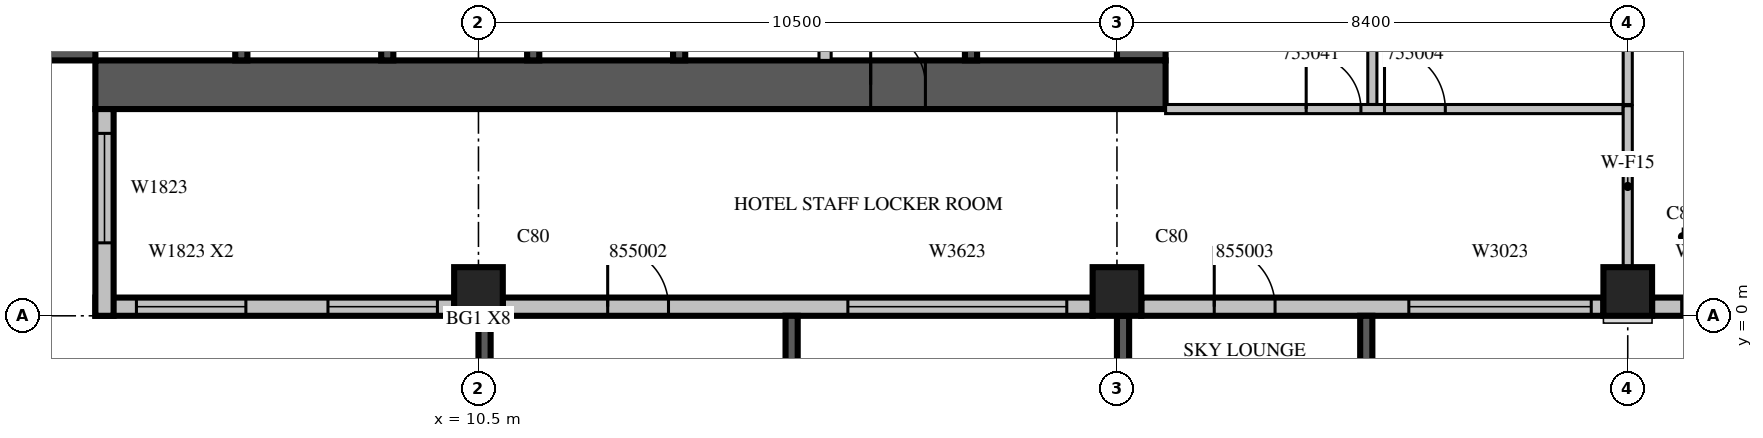
"""IFC4 building model, lengths in metres.
Left out: names, types, materials, properties, quantities, classifications, styles, units other than length and angle.
Written with IfcOpenShell. Run it as: python <this file> out.ifc"""

import sys

from ifc_helpers import new_model, si_unit, direction, frame, frame_2d, origin, origin_2d, place, context, subcontext, project, spatial, rectangle, extrude, source, transform, mapped, element, fill, save


model = new_model("IFC4")
c1 = context("Model", 3, precision=1e-05, world=origin(), true_north=direction((0.0, 1.0)))
c2 = subcontext(c1, "Body", "Model", "MODEL_VIEW")
j1 = project(units=[si_unit("LENGTHUNIT", "METRE"), si_unit("PLANEANGLEUNIT", "RADIAN")], contexts=[c1])
p1 = place(None, origin())
s1 = spatial("IfcSite", under=j1, at=p1, CompositionType="ELEMENT")
p2 = place(p1, origin())
s2 = spatial("IfcBuilding", under=s1, at=p2, CompositionType="ELEMENT")
p3 = place(p2, frame((0.0, 0.0, 242.4)))
s3 = spatial("IfcBuildingStorey", under=s2, at=p3, CompositionType="ELEMENT", Elevation=242.4)
m1 = source(origin(), c2, "Body", "SweptSolid", [
    extrude(rectangle(XDim=0.8, YDim=0.8, at=origin_2d()), origin(), (0.0, 0.0, 1.0), 3.8),
])
for number, where, z_axis, x_axis in (
    (1, (10.5, 0.4, 0.0), (0.0, 0.0, 1.0), (1.0, 0.0, 0.0)),
    (2, (21.0, 0.4, 0.0), (0.0, 0.0, 1.0), (1.0, 0.0, 0.0)),
    (3, (29.4, 0.4, 0.0), (0.0, 0.0, 1.0), (1.0, 0.0, 0.0)),
):
    element("IfcColumn", number, at=place(p3, frame(where, z_axis=z_axis, x_axis=x_axis)), inside=s3, PredefinedType="COLUMN", context=c2, shape_type="MappedRepresentation", body=[
        mapped(m1, transform((0.0, 0.0, 0.0), scale=1.0)),
    ])
m2 = source(origin(), c2, "Body", "SweptSolid", [
    extrude(rectangle(XDim=17.6, YDim=0.8, at=frame_2d((8.8, 0.0))), origin(), (0.0, 0.0, 1.0), 3.8),
])
p4 = place(p3, frame((3.8, 4.2, 0.0), z_axis=(0.0, 0.0, 1.0), x_axis=(0.0, 1.0, 0.0)))
e4 = element("IfcWall", 4, at=p4, inside=s3, PredefinedType="SHEAR", context=c2, shape_type="MappedRepresentation", body=[
    mapped(m2, transform((0.0, 0.0, 0.0), scale=1.0)),
])
m3 = source(origin(), c2, "Body", "SweptSolid", [
    extrude(rectangle(XDim=2.2, YDim=2.1, at=frame_2d((1.1, 1.05))), frame((0.0, 0.41, 0.0), z_axis=(0.0, -1.0, 0.0), x_axis=(1.0, 0.0, 0.0)), (0.0, 0.0, 1.0), 0.82),
])
p5 = place(p4, frame((4.2, 0.0, 0.0)))
e5 = element("IfcOpeningElement", 5, at=p5, cuts=e4, PredefinedType="OPENING", context=c2, shape_type="MappedRepresentation", body=[
    mapped(m3, transform((0.0, 0.0, 0.0), scale=1.0)),
])
m4 = source(origin(), c2, "Body", "SweptSolid", [
    extrude(rectangle(XDim=0.9, YDim=2.1, at=frame_2d((0.45, 1.05))), frame((0.0, 0.41, 0.0), z_axis=(0.0, -1.0, 0.0), x_axis=(1.0, 0.0, 0.0)), (0.0, 0.0, 1.0), 0.82),
])
p6 = place(p4, frame((10.95, 0.0, 0.0)))
e6 = element("IfcOpeningElement", 6, at=p6, cuts=e4, PredefinedType="OPENING", context=c2, shape_type="MappedRepresentation", body=[
    mapped(m4, transform((0.0, 0.0, 0.0), scale=1.0)),
])
m5 = source(origin(), c2, "Body", "SweptSolid", [
    extrude(rectangle(XDim=16.8, YDim=0.8, at=frame_2d((8.4, 0.0))), origin(), (0.0, 0.0, 1.0), 3.8),
])
p7 = place(p3, frame((21.4, 4.2, 0.0), z_axis=(0.0, 0.0, 1.0), x_axis=(0.0, 1.0, 0.0)))
e7 = element("IfcWall", 7, at=p7, inside=s3, PredefinedType="SHEAR", context=c2, shape_type="MappedRepresentation", body=[
    mapped(m5, transform((0.0, 0.0, 0.0), scale=1.0)),
])
p8 = place(p7, frame((4.2, 0.0, 0.0)))
e8 = element("IfcOpeningElement", 8, at=p8, cuts=e7, PredefinedType="OPENING", context=c2, shape_type="MappedRepresentation", body=[
    mapped(m3, transform((0.0, 0.0, 0.0), scale=1.0)),
])
m6 = source(origin(), c2, "Body", "SweptSolid", [
    extrude(rectangle(XDim=1.2, YDim=2.1, at=frame_2d((0.6, 1.05))), frame((0.0, 0.41, 0.0), z_axis=(0.0, -1.0, 0.0), x_axis=(1.0, 0.0, 0.0)), (0.0, 0.0, 1.0), 0.82),
])
p9 = place(p7, frame((14.7, 0.0, 0.0)))
e9 = element("IfcOpeningElement", 9, at=p9, cuts=e7, PredefinedType="OPENING", context=c2, shape_type="MappedRepresentation", body=[
    mapped(m6, transform((0.0, 0.0, 0.0), scale=1.0)),
])
p10 = place(p3, frame((4.2, 3.8, 0.0), z_axis=(0.0, 0.0, 1.0), x_axis=(1.0, 0.0, 0.0)))
e10 = element("IfcWall", 10, at=p10, inside=s3, PredefinedType="SHEAR", context=c2, shape_type="MappedRepresentation", body=[
    mapped(m2, transform((0.0, 0.0, 0.0), scale=1.0)),
])
p11 = place(p10, frame((12.75, 0.0, 0.0)))
e11 = element("IfcOpeningElement", 11, at=p11, cuts=e10, PredefinedType="OPENING", context=c2, shape_type="MappedRepresentation", body=[
    mapped(m4, transform((0.0, 0.0, 0.0), scale=1.0)),
])
m7 = source(origin(), c2, "Body", "SweptSolid", [
    extrude(rectangle(XDim=5.9, YDim=0.3, at=frame_2d((2.95, 0.0))), origin(), (0.0, 0.0, 1.0), 3.4),
])
p12 = place(p3, frame((4.2, 0.15, 0.0), z_axis=(0.0, 0.0, 1.0), x_axis=(1.0, 0.0, 0.0)))
e12 = element("IfcWall", 12, at=p12, inside=s3, PredefinedType="STANDARD", context=c2, shape_type="MappedRepresentation", body=[
    mapped(m7, transform((0.0, 0.0, 0.0), scale=1.0)),
])
m8 = source(origin(), c2, "Body", "SweptSolid", [
    extrude(rectangle(XDim=1.8, YDim=2.3, at=frame_2d((0.9, 1.15))), frame((0.0, 0.16, 0.0), z_axis=(0.0, -1.0, 0.0), x_axis=(1.0, 0.0, 0.0)), (0.0, 0.0, 1.0), 0.32),
])
p13 = place(p12, frame((0.675, 0.0, 0.6)))
e13 = element("IfcOpeningElement", 13, at=p13, cuts=e12, PredefinedType="OPENING", context=c2, shape_type="MappedRepresentation", body=[
    mapped(m8, transform((0.0, 0.0, 0.0), scale=1.0)),
])
p14 = place(p12, frame((3.825, 0.0, 0.6)))
e14 = element("IfcOpeningElement", 14, at=p14, cuts=e12, PredefinedType="OPENING", context=c2, shape_type="MappedRepresentation", body=[
    mapped(m8, transform((0.0, 0.0, 0.0), scale=1.0)),
])
m9 = source(origin(), c2, "Body", "SweptSolid", [
    extrude(rectangle(XDim=9.7, YDim=0.3, at=frame_2d((4.85, 0.0))), origin(), (0.0, 0.0, 1.0), 3.4),
])
p15 = place(p3, frame((10.9, 0.15, 0.0), z_axis=(0.0, 0.0, 1.0), x_axis=(1.0, 0.0, 0.0)))
e15 = element("IfcWall", 15, at=p15, inside=s3, PredefinedType="STANDARD", context=c2, shape_type="MappedRepresentation", body=[
    mapped(m9, transform((0.0, 0.0, 0.0), scale=1.0)),
])
m10 = source(origin(), c2, "Body", "SweptSolid", [
    extrude(rectangle(XDim=3.6, YDim=2.3, at=frame_2d((1.8, 1.15))), frame((0.0, 0.16, 0.0), z_axis=(0.0, -1.0, 0.0), x_axis=(1.0, 0.0, 0.0)), (0.0, 0.0, 1.0), 0.32),
])
p16 = place(p15, frame((5.675, 0.0, 0.6)))
e16 = element("IfcOpeningElement", 16, at=p16, cuts=e15, PredefinedType="OPENING", context=c2, shape_type="MappedRepresentation", body=[
    mapped(m10, transform((0.0, 0.0, 0.0), scale=1.0)),
])
m11 = source(origin(), c2, "Body", "SweptSolid", [
    extrude(rectangle(XDim=1.0, YDim=2.1, at=frame_2d((0.5, 1.05))), frame((0.0, 0.16, 0.0), z_axis=(0.0, -1.0, 0.0), x_axis=(1.0, 0.0, 0.0)), (0.0, 0.0, 1.0), 0.32),
])
p17 = place(p15, frame((1.725, 0.0, 0.0)))
e17 = element("IfcOpeningElement", 17, at=p17, cuts=e15, PredefinedType="OPENING", context=c2, shape_type="MappedRepresentation", body=[
    mapped(m11, transform((0.0, 0.0, 0.0), scale=1.0)),
])
m12 = source(origin(), c2, "Body", "SweptSolid", [
    extrude(rectangle(XDim=7.6, YDim=0.3, at=frame_2d((3.8, 0.0))), origin(), (0.0, 0.0, 1.0), 3.4),
])
p18 = place(p3, frame((21.4, 0.15, 0.0), z_axis=(0.0, 0.0, 1.0), x_axis=(1.0, 0.0, 0.0)))
e18 = element("IfcWall", 18, at=p18, inside=s3, PredefinedType="STANDARD", context=c2, shape_type="MappedRepresentation", body=[
    mapped(m12, transform((0.0, 0.0, 0.0), scale=1.0)),
])
m13 = source(origin(), c2, "Body", "SweptSolid", [
    extrude(rectangle(XDim=3.0, YDim=2.3, at=frame_2d((1.5, 1.15))), frame((0.0, 0.16, 0.0), z_axis=(0.0, -1.0, 0.0), x_axis=(1.0, 0.0, 0.0)), (0.0, 0.0, 1.0), 0.32),
])
p19 = place(p18, frame((4.4, 0.0, 0.6)))
e19 = element("IfcOpeningElement", 19, at=p19, cuts=e18, PredefinedType="OPENING", context=c2, shape_type="MappedRepresentation", body=[
    mapped(m13, transform((0.0, 0.0, 0.0), scale=1.0)),
])
p20 = place(p18, frame((1.2, 0.0, 0.0)))
e20 = element("IfcOpeningElement", 20, at=p20, cuts=e18, PredefinedType="OPENING", context=c2, shape_type="MappedRepresentation", body=[
    mapped(m11, transform((0.0, 0.0, 0.0), scale=1.0)),
])
p21 = place(p3, frame((29.8, 0.15, 0.0), z_axis=(0.0, 0.0, 1.0), x_axis=(1.0, 0.0, 0.0)))
e21 = element("IfcWall", 21, at=p21, inside=s3, PredefinedType="STANDARD", context=c2, shape_type="MappedRepresentation", body=[
    mapped(m12, transform((0.0, 0.0, 0.0), scale=1.0)),
])
m14 = source(origin(), c2, "Body", "SweptSolid", [
    extrude(rectangle(XDim=1.2, YDim=2.3, at=frame_2d((0.6, 1.15))), frame((0.0, 0.16, 0.0), z_axis=(0.0, -1.0, 0.0), x_axis=(1.0, 0.0, 0.0)), (0.0, 0.0, 1.0), 0.32),
])
p22 = place(p21, frame((0.487, 0.0, 0.6)))
e22 = element("IfcOpeningElement", 22, at=p22, cuts=e21, PredefinedType="OPENING", context=c2, shape_type="MappedRepresentation", body=[
    mapped(m14, transform((0.0, 0.0, 0.0), scale=1.0)),
])
p23 = place(p21, frame((6.013, 0.0, 0.6)))
e23 = element("IfcOpeningElement", 23, at=p23, cuts=e21, PredefinedType="OPENING", context=c2, shape_type="MappedRepresentation", body=[
    mapped(m14, transform((0.0, 0.0, 0.0), scale=1.0)),
])
m15 = source(origin(), c2, "Body", "SweptSolid", [
    extrude(rectangle(XDim=3.4, YDim=0.3, at=frame_2d((1.7, 0.0))), origin(), (0.0, 0.0, 1.0), 3.4),
])
p24 = place(p3, frame((4.35, 3.4, 0.0), z_axis=(0.0, 0.0, 1.0), x_axis=(0.0, -1.0, 0.0)))
e24 = element("IfcWall", 24, at=p24, inside=s3, PredefinedType="STANDARD", context=c2, shape_type="MappedRepresentation", body=[
    mapped(m15, transform((0.0, 0.0, 0.0), scale=1.0)),
])
p25 = place(p24, frame((0.4, 0.0, 0.6)))
e25 = element("IfcOpeningElement", 25, at=p25, cuts=e24, PredefinedType="OPENING", context=c2, shape_type="MappedRepresentation", body=[
    mapped(m8, transform((0.0, 0.0, 0.0), scale=1.0)),
])
m16 = source(origin(), c2, "Body", "SweptSolid", [
    extrude(rectangle(XDim=3.9, YDim=0.2, at=frame_2d((1.95, 0.0))), origin(), (0.0, 0.0, 1.0), 3.39),
])
p26 = place(p3, frame((10.6, 0.0, 0.0), z_axis=(0.0, 0.0, 1.0), x_axis=(0.0, -1.0, 0.0)))
e26 = element("IfcWall", 26, at=p26, inside=s3, PredefinedType="SOLIDWALL", context=c2, shape_type="MappedRepresentation", body=[
    mapped(m16, transform((0.0, 0.0, 0.0), scale=1.0)),
])
m17 = source(origin(), c2, "Body", "SweptSolid", [
    extrude(rectangle(XDim=2.4, YDim=2.3, at=frame_2d((1.2, 1.15))), frame((0.0, 0.11, 0.0), z_axis=(0.0, -1.0, 0.0), x_axis=(1.0, 0.0, 0.0)), (0.0, 0.0, 1.0), 0.22),
])
p27 = place(p26, frame((0.75, 0.0, 0.6)))
e27 = element("IfcOpeningElement", 27, at=p27, cuts=e26, PredefinedType="OPENING", context=c2, shape_type="MappedRepresentation", body=[
    mapped(m17, transform((0.0, 0.0, 0.0), scale=1.0)),
])
p28 = place(p3, frame((15.65, 0.0, 0.0), z_axis=(0.0, 0.0, 1.0), x_axis=(0.0, -1.0, 0.0)))
e28 = element("IfcWall", 28, at=p28, inside=s3, PredefinedType="SOLIDWALL", context=c2, shape_type="MappedRepresentation", body=[
    mapped(m16, transform((0.0, 0.0, 0.0), scale=1.0)),
])
p29 = place(p28, frame((0.75, 0.0, 0.6)))
e29 = element("IfcOpeningElement", 29, at=p29, cuts=e28, PredefinedType="OPENING", context=c2, shape_type="MappedRepresentation", body=[
    mapped(m17, transform((0.0, 0.0, 0.0), scale=1.0)),
])
p30 = place(p3, frame((21.1, 0.0, 0.0), z_axis=(0.0, 0.0, 1.0), x_axis=(0.0, -1.0, 0.0)))
e30 = element("IfcWall", 30, at=p30, inside=s3, PredefinedType="SOLIDWALL", context=c2, shape_type="MappedRepresentation", body=[
    mapped(m16, transform((0.0, 0.0, 0.0), scale=1.0)),
])
p31 = place(p30, frame((0.75, 0.0, 0.6)))
e31 = element("IfcOpeningElement", 31, at=p31, cuts=e30, PredefinedType="OPENING", context=c2, shape_type="MappedRepresentation", body=[
    mapped(m17, transform((0.0, 0.0, 0.0), scale=1.0)),
])
p32 = place(p3, frame((25.1, 0.0, 0.0), z_axis=(0.0, 0.0, 1.0), x_axis=(0.0, -1.0, 0.0)))
e32 = element("IfcWall", 32, at=p32, inside=s3, PredefinedType="SOLIDWALL", context=c2, shape_type="MappedRepresentation", body=[
    mapped(m16, transform((0.0, 0.0, 0.0), scale=1.0)),
])
p33 = place(p32, frame((0.75, 0.0, 0.6)))
e33 = element("IfcOpeningElement", 33, at=p33, cuts=e32, PredefinedType="OPENING", context=c2, shape_type="MappedRepresentation", body=[
    mapped(m17, transform((0.0, 0.0, 0.0), scale=1.0)),
])
m18 = source(origin(), c2, "Body", "SweptSolid", [
    extrude(rectangle(XDim=3.1, YDim=0.2, at=frame_2d((1.55, 0.0))), origin(), (0.0, 0.0, 1.0), 3.8),
])
for number, where, z_axis, x_axis in (
    (34, (6.6, 4.2, 0.0), (0.0, 0.0, 1.0), (0.0, 1.0, 0.0)),
    (35, (9.0, 4.2, 0.0), (0.0, 0.0, 1.0), (0.0, 1.0, 0.0)),
    (36, (11.4, 4.2, 0.0), (0.0, 0.0, 1.0), (0.0, 1.0, 0.0)),
):
    element("IfcWall", number, at=place(p3, frame(where, z_axis=z_axis, x_axis=x_axis)), inside=s3, PredefinedType="SOLIDWALL", context=c2, shape_type="MappedRepresentation", body=[
        mapped(m18, transform((0.0, 0.0, 0.0), scale=1.0)),
    ])
m19 = source(origin(), c2, "Body", "SweptSolid", [
    extrude(rectangle(XDim=3.1, YDim=0.2, at=frame_2d((1.55, 0.0))), origin(), (0.0, 0.0, 1.0), 3.4),
])
for number, where, z_axis, x_axis in (
    (37, (13.8, 4.2, 0.0), (0.0, 0.0, 1.0), (0.0, 1.0, 0.0)),
    (38, (18.6, 4.2, 0.0), (0.0, 0.0, 1.0), (0.0, 1.0, 0.0)),
):
    element("IfcWall", number, at=place(p3, frame(where, z_axis=z_axis, x_axis=x_axis)), inside=s3, PredefinedType="SOLIDWALL", context=c2, shape_type="MappedRepresentation", body=[
        mapped(m19, transform((0.0, 0.0, 0.0), scale=1.0)),
    ])
m20 = source(origin(), c2, "Body", "SweptSolid", [
    extrude(rectangle(XDim=3.1, YDim=0.2, at=frame_2d((1.55, 0.0))), origin(), (0.0, 0.0, 1.0), 3.4),
])
p34 = place(p3, frame((16.2, 4.2, 0.0), z_axis=(0.0, 0.0, 1.0), x_axis=(0.0, 1.0, 0.0)))
e39 = element("IfcWall", 39, at=p34, inside=s3, PredefinedType="PARTITIONING", context=c2, shape_type="MappedRepresentation", body=[
    mapped(m20, transform((0.0, 0.0, 0.0), scale=1.0)),
])
m21 = source(origin(), c2, "Body", "SweptSolid", [
    extrude(rectangle(XDim=11.225, YDim=0.15, at=frame_2d((5.612, 0.0))), origin(), (0.0, 0.0, 1.0), 3.4),
])
p35 = place(p3, frame((25.2, 14.7, 0.0), z_axis=(0.0, 0.0, 1.0), x_axis=(0.0, -1.0, 0.0)))
e40 = element("IfcWall", 40, at=p35, inside=s3, PredefinedType="PARTITIONING", context=c2, shape_type="MappedRepresentation", body=[
    mapped(m21, transform((0.0, 0.0, 0.0), scale=1.0)),
])
m22 = source(origin(), c2, "Body", "SweptSolid", [
    extrude(rectangle(XDim=0.9, YDim=2.1, at=frame_2d((0.45, 1.05))), frame((0.0, 0.085, 0.0), z_axis=(0.0, -1.0, 0.0), x_axis=(1.0, 0.0, 0.0)), (0.0, 0.0, 1.0), 0.17),
])
p36 = place(p35, frame((6.662, 0.0, 0.0)))
e41 = element("IfcOpeningElement", 41, at=p36, cuts=e40, PredefinedType="OPENING", context=c2, shape_type="MappedRepresentation", body=[
    mapped(m22, transform((0.0, 0.0, 0.0), scale=1.0)),
])
p37 = place(p35, frame((0.175, 0.0, 0.0)))
e42 = element("IfcOpeningElement", 42, at=p37, cuts=e40, PredefinedType="OPENING", context=c2, shape_type="MappedRepresentation", body=[
    mapped(m22, transform((0.0, 0.0, 0.0), scale=1.0)),
])
m23 = source(origin(), c2, "Body", "SweptSolid", [
    extrude(rectangle(XDim=6.626, YDim=0.15, at=frame_2d((3.313, 0.0))), origin(), (0.0, 0.0, 1.0), 3.4),
])
p38 = place(p3, frame((29.4, 3.475, 0.0), z_axis=(0.0, 0.0, 1.0), x_axis=(0.0, 1.0, 0.0)))
e43 = element("IfcWall", 43, at=p38, inside=s3, PredefinedType="PARTITIONING", context=c2, shape_type="MappedRepresentation", body=[
    mapped(m23, transform((0.0, 0.0, 0.0), scale=1.0)),
])
m24 = source(origin(), c2, "Body", "SweptSolid", [
    extrude(rectangle(XDim=7.525, YDim=0.15, at=frame_2d((3.763, 0.0))), origin(), (0.0, 0.0, 1.0), 3.4),
])
p39 = place(p3, frame((21.8, 3.4, 0.0), z_axis=(0.0, 0.0, 1.0), x_axis=(1.0, 0.0, 0.0)))
e44 = element("IfcWall", 44, at=p39, inside=s3, PredefinedType="PARTITIONING", context=c2, shape_type="MappedRepresentation", body=[
    mapped(m24, transform((0.0, 0.0, 0.0), scale=1.0)),
])
m25 = source(origin(), c2, "Body", "SweptSolid", [
    extrude(rectangle(XDim=1.0, YDim=2.1, at=frame_2d((0.5, 1.05))), frame((0.0, 0.085, 0.0), z_axis=(0.0, -1.0, 0.0), x_axis=(1.0, 0.0, 0.0)), (0.0, 0.0, 1.0), 0.17),
])
p40 = place(p39, frame((3.6, 0.0, 0.0)))
e45 = element("IfcOpeningElement", 45, at=p40, cuts=e44, PredefinedType="OPENING", context=c2, shape_type="MappedRepresentation", body=[
    mapped(m25, transform((0.0, 0.0, 0.0), scale=1.0)),
])
p41 = place(p39, frame((2.312, 0.0, 0.0)))
e46 = element("IfcOpeningElement", 46, at=p41, cuts=e44, PredefinedType="OPENING", context=c2, shape_type="MappedRepresentation", body=[
    mapped(m22, transform((0.0, 0.0, 0.0), scale=1.0)),
])
m26 = source(origin(), c2, "Body", "SweptSolid", [
    extrude(rectangle(XDim=2.656, YDim=0.15, at=frame_2d((1.328, 0.0))), origin(), (0.0, 0.0, 1.0), 3.4),
])
p42 = place(p3, frame((29.4, 0.799, 0.0), z_axis=(0.0, 0.0, 1.0), x_axis=(0.0, 1.0, 0.0)))
e47 = element("IfcWall", 47, at=p42, inside=s3, PredefinedType="PARTITIONING", context=c2, shape_type="MappedRepresentation", body=[
    mapped(m26, transform((0.0, 0.0, 0.0), scale=1.0)),
])
m27 = source(origin(), c2, "Body", "SweptSolid", [
    extrude(rectangle(XDim=1.8, YDim=2.3, at=frame_2d((0.9, 1.15))), frame((0.0, 0.03, 0.0), z_axis=(0.0, -1.0, 0.0), x_axis=(1.0, 0.0, 0.0)), (0.0, 0.0, 1.0), 0.06),
])
p43 = place(p13, origin())
e48 = element("IfcWindow", 48, at=p43, inside=s3, PartitioningType="SINGLE_PANEL", PredefinedType="WINDOW", context=c2, shape_type="MappedRepresentation", body=[
    mapped(m27, transform((0.0, 0.0, 0.0), scale=1.0)),
])
fill(e13, e48)
p44 = place(p14, origin())
e49 = element("IfcWindow", 49, at=p44, inside=s3, PartitioningType="SINGLE_PANEL", PredefinedType="WINDOW", context=c2, shape_type="MappedRepresentation", body=[
    mapped(m27, transform((0.0, 0.0, 0.0), scale=1.0)),
])
fill(e14, e49)
m28 = source(origin(), c2, "Body", "SweptSolid", [
    extrude(rectangle(XDim=3.6, YDim=2.3, at=frame_2d((1.8, 1.15))), frame((0.0, 0.03, 0.0), z_axis=(0.0, -1.0, 0.0), x_axis=(1.0, 0.0, 0.0)), (0.0, 0.0, 1.0), 0.06),
])
p45 = place(p16, origin())
e50 = element("IfcWindow", 50, at=p45, inside=s3, PartitioningType="SINGLE_PANEL", PredefinedType="WINDOW", context=c2, shape_type="MappedRepresentation", body=[
    mapped(m28, transform((0.0, 0.0, 0.0), scale=1.0)),
])
fill(e16, e50)
m29 = source(origin(), c2, "Body", "SweptSolid", [
    extrude(rectangle(XDim=3.0, YDim=2.3, at=frame_2d((1.5, 1.15))), frame((0.0, 0.03, 0.0), z_axis=(0.0, -1.0, 0.0), x_axis=(1.0, 0.0, 0.0)), (0.0, 0.0, 1.0), 0.06),
])
p46 = place(p19, origin())
e51 = element("IfcWindow", 51, at=p46, inside=s3, PartitioningType="SINGLE_PANEL", PredefinedType="WINDOW", context=c2, shape_type="MappedRepresentation", body=[
    mapped(m29, transform((0.0, 0.0, 0.0), scale=1.0)),
])
fill(e19, e51)
m30 = source(origin(), c2, "Body", "SweptSolid", [
    extrude(rectangle(XDim=1.2, YDim=2.3, at=frame_2d((0.6, 1.15))), frame((0.0, 0.03, 0.0), z_axis=(0.0, -1.0, 0.0), x_axis=(1.0, 0.0, 0.0)), (0.0, 0.0, 1.0), 0.06),
])
p47 = place(p22, origin())
e52 = element("IfcWindow", 52, at=p47, inside=s3, PartitioningType="SINGLE_PANEL", PredefinedType="WINDOW", context=c2, shape_type="MappedRepresentation", body=[
    mapped(m30, transform((0.0, 0.0, 0.0), scale=1.0)),
])
fill(e22, e52)
p48 = place(p25, origin())
e53 = element("IfcWindow", 53, at=p48, inside=s3, PartitioningType="SINGLE_PANEL", PredefinedType="WINDOW", context=c2, shape_type="MappedRepresentation", body=[
    mapped(m27, transform((0.0, 0.0, 0.0), scale=1.0)),
])
fill(e25, e53)
m31 = source(origin(), c2, "Body", "SweptSolid", [
    extrude(rectangle(XDim=0.9, YDim=2.1, at=frame_2d((0.45, 1.05))), frame((0.0, 0.025, 0.0), z_axis=(0.0, -1.0, 0.0), x_axis=(1.0, 0.0, 0.0)), (0.0, 0.0, 1.0), 0.05),
])
p49 = place(p11, origin())
e54 = element("IfcDoor", 54, at=p49, inside=s3, OperationType="SINGLE_SWING_LEFT", PredefinedType="DOOR", context=c2, shape_type="MappedRepresentation", body=[
    mapped(m31, transform((0.0, 0.0, 0.0), scale=1.0)),
])
fill(e11, e54)
m32 = source(origin(), c2, "Body", "SweptSolid", [
    extrude(rectangle(XDim=1.0, YDim=2.1, at=frame_2d((0.5, 1.05))), frame((0.0, 0.025, 0.0), z_axis=(0.0, -1.0, 0.0), x_axis=(1.0, 0.0, 0.0)), (0.0, 0.0, 1.0), 0.05),
])
p50 = place(p40, origin())
e55 = element("IfcDoor", 55, at=p50, inside=s3, OperationType="SINGLE_SWING_LEFT", PredefinedType="DOOR", context=c2, shape_type="MappedRepresentation", body=[
    mapped(m32, transform((0.0, 0.0, 0.0), scale=1.0)),
])
fill(e45, e55)
p51 = place(p41, origin())
e56 = element("IfcDoor", 56, at=p51, inside=s3, OperationType="SINGLE_SWING_LEFT", PredefinedType="DOOR", context=c2, shape_type="MappedRepresentation", body=[
    mapped(m31, transform((0.0, 0.0, 0.0), scale=1.0)),
])
fill(e46, e56)
p52 = place(p17, origin())
e57 = element("IfcDoor", 57, at=p52, inside=s3, OperationType="SINGLE_SWING_LEFT", PredefinedType="DOOR", context=c2, shape_type="MappedRepresentation", body=[
    mapped(m32, transform((0.0, 0.0, 0.0), scale=1.0)),
])
fill(e17, e57)
p53 = place(p20, origin())
e58 = element("IfcDoor", 58, at=p53, inside=s3, OperationType="SINGLE_SWING_LEFT", PredefinedType="DOOR", context=c2, shape_type="MappedRepresentation", body=[
    mapped(m32, transform((0.0, 0.0, 0.0), scale=1.0)),
])
fill(e20, e58)
save(model, sys.argv[1])
